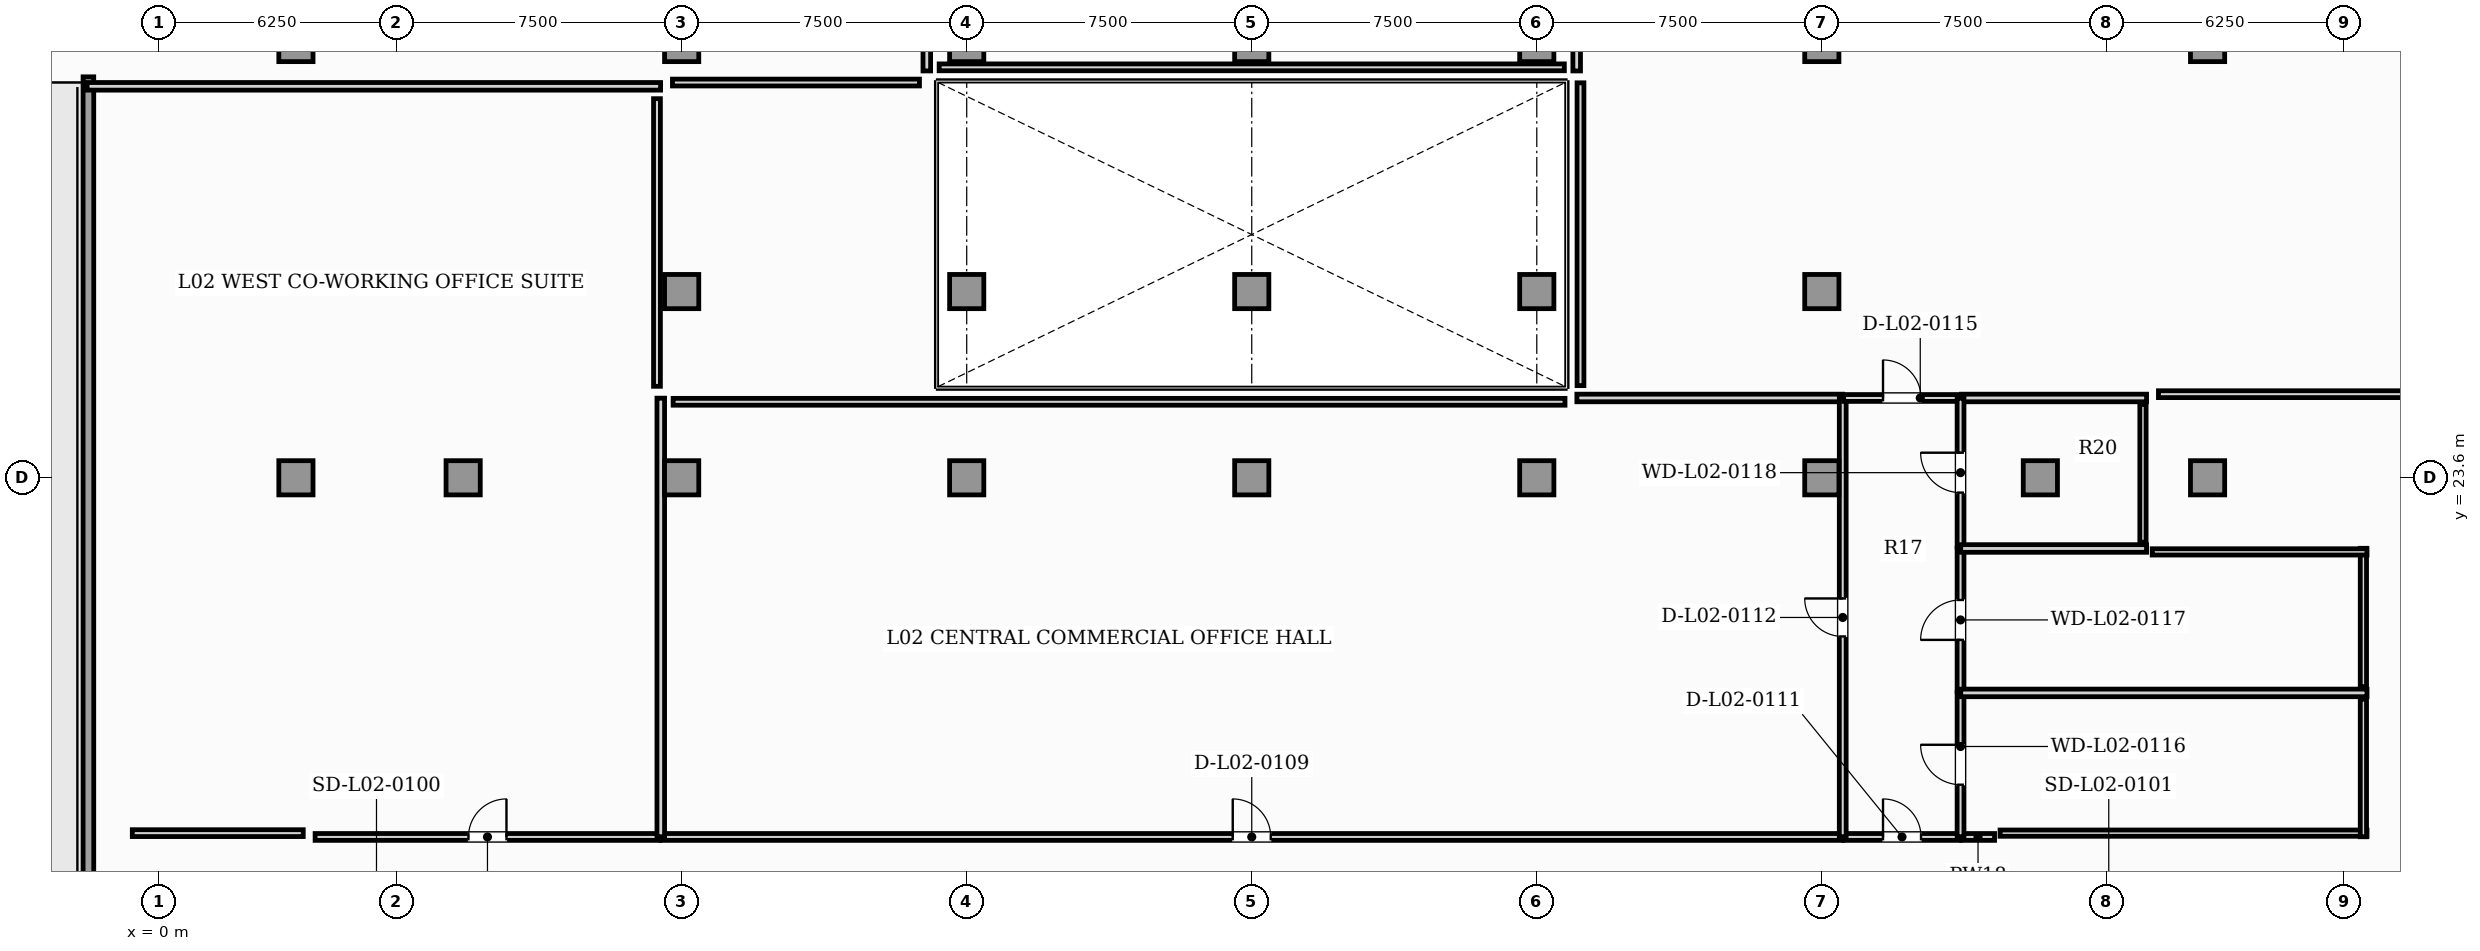
"""IFC4 building model, lengths in metres.
Left out: names, types, materials, properties, quantities, classifications, styles, units other than length and angle.
Written with IfcOpenShell. Run it as: python <this file> out.ifc"""

import sys

from ifc_helpers import new_model, si_unit, direction, frame, frame_2d, origin, origin_2d, place, context, subcontext, project, spatial, rectangle, extrude, element, fill, save


model = new_model("IFC4")
c1 = context("Model", 3, precision=1e-05, world=origin(), true_north=direction((0.0, 1.0)))
c2 = subcontext(c1, "Body", "Model", "MODEL_VIEW")
j1 = project(units=[si_unit("LENGTHUNIT", "METRE"), si_unit("PLANEANGLEUNIT", "RADIAN")], contexts=[c1])
p1 = place(None, origin())
s1 = spatial("IfcSite", under=j1, at=p1, CompositionType="ELEMENT")
p2 = place(p1, origin())
s2 = spatial("IfcBuilding", under=s1, at=p2, CompositionType="ELEMENT")
p3 = place(p2, frame((0.0, 0.0, 10.2)))
s3 = spatial("IfcBuildingStorey", under=s2, at=p3, CompositionType="ELEMENT", Elevation=10.2)
p4 = place(p3, frame((-1.86, 3.88, 0.0), z_axis=(0.0, 0.0, 1.0), x_axis=(0.0, 1.0, 0.0)))
e1 = element("IfcWall", 1, at=p4, inside=s3, PredefinedType="SHEAR", context=c2, shape_type="SweptSolid", body=[
    extrude(rectangle(XDim=30.27, YDim=0.28, at=frame_2d((15.135, 0.0))), origin(), (0.0, 0.0, 1.0), 4.52),
])
for number, where, z_axis, x_axis in (
    (2, (3.6, 23.6, 0.0), (0.0, 0.0, 1.0), (1.0, 0.0, 0.0)),
    (3, (3.6, 35.0, 0.0), (0.0, 0.0, 1.0), (1.0, 0.0, 0.0)),
    (4, (13.75, 23.6, 0.0), (0.0, 0.0, 1.0), (1.0, 0.0, 0.0)),
    (5, (13.75, 35.0, 0.0), (0.0, 0.0, 1.0), (1.0, 0.0, 0.0)),
    (6, (28.75, 23.6, 0.0), (0.0, 0.0, 1.0), (1.0, 0.0, 0.0)),
    (7, (28.75, 35.0, 0.0), (0.0, 0.0, 1.0), (1.0, 0.0, 0.0)),
    (8, (43.75, 23.6, 0.0), (0.0, 0.0, 1.0), (1.0, 0.0, 0.0)),
    (9, (43.75, 35.0, 0.0), (0.0, 0.0, 1.0), (1.0, 0.0, 0.0)),
    (10, (53.9, 23.6, 0.0), (0.0, 0.0, 1.0), (1.0, 0.0, 0.0)),
    (11, (53.9, 35.0, 0.0), (0.0, 0.0, 1.0), (1.0, 0.0, 0.0)),
    (12, (8.0, 23.6, 0.0), (0.0, 0.0, 1.0), (1.0, 0.0, 0.0)),
    (13, (21.25, 23.6, 0.0), (0.0, 0.0, 1.0), (1.0, 0.0, 0.0)),
    (14, (36.25, 23.6, 0.0), (0.0, 0.0, 1.0), (1.0, 0.0, 0.0)),
    (15, (49.5, 23.6, 0.0), (0.0, 0.0, 1.0), (1.0, 0.0, 0.0)),
    (16, (13.75, 28.5, 0.0), (0.0, 0.0, 1.0), (1.0, 0.0, 0.0)),
    (17, (21.25, 28.5, 0.0), (0.0, 0.0, 1.0), (1.0, 0.0, 0.0)),
    (18, (28.75, 28.5, 0.0), (0.0, 0.0, 1.0), (1.0, 0.0, 0.0)),
    (19, (36.25, 28.5, 0.0), (0.0, 0.0, 1.0), (1.0, 0.0, 0.0)),
    (20, (43.75, 28.5, 0.0), (0.0, 0.0, 1.0), (1.0, 0.0, 0.0)),
    (21, (21.25, 35.0, 0.0), (0.0, 0.0, 1.0), (1.0, 0.0, 0.0)),
    (22, (36.25, 35.0, 0.0), (0.0, 0.0, 1.0), (1.0, 0.0, 0.0)),
):
    element("IfcColumn", number, at=place(p3, frame(where, z_axis=z_axis, x_axis=x_axis)), inside=s3, PredefinedType="COLUMN", context=c2, shape_type="SweptSolid", body=[
        extrude(rectangle(XDim=0.9, YDim=0.9, at=origin_2d()), origin(), (0.0, 0.0, 1.0), 4.8),
    ])
p5 = place(p3, frame((13.205, 14.15, 0.0), z_axis=(0.0, 0.0, 1.0), x_axis=(1.0, 0.0, 0.0)))
e23 = element("IfcWall", 23, at=p5, inside=s3, PredefinedType="PARTITIONING", context=c2, shape_type="SweptSolid", body=[
    extrude(rectangle(XDim=31.09, YDim=0.18, at=frame_2d((15.545, 0.0))), origin(), (0.0, 0.0, 1.0), 4.52),
])
p6 = place(p5, frame((15.045, 0.0, 0.0)))
e24 = element("IfcOpeningElement", 24, at=p6, cuts=e23, PredefinedType="OPENING", context=c2, shape_type="SweptSolid", body=[
    extrude(rectangle(XDim=1.0, YDim=2.15, at=frame_2d((0.5, 1.075))), frame((0.0, 0.1, 0.0), z_axis=(0.0, -1.0, 0.0), x_axis=(1.0, 0.0, 0.0)), (0.0, 0.0, 1.0), 0.2),
])
p7 = place(p3, frame((4.105, 14.15, 0.0), z_axis=(0.0, 0.0, 1.0), x_axis=(1.0, 0.0, 0.0)))
e25 = element("IfcWall", 25, at=p7, inside=s3, PredefinedType="PARTITIONING", context=c2, shape_type="SweptSolid", body=[
    extrude(rectangle(XDim=9.07, YDim=0.18, at=frame_2d((4.535, 0.0))), origin(), (0.0, 0.0, 1.0), 4.52),
])
p8 = place(p7, frame((4.035, 0.0, 0.0)))
e26 = element("IfcOpeningElement", 26, at=p8, cuts=e25, PredefinedType="OPENING", context=c2, shape_type="SweptSolid", body=[
    extrude(rectangle(XDim=1.0, YDim=2.15, at=frame_2d((0.5, 1.075))), frame((0.0, 0.1, 0.0), z_axis=(0.0, -1.0, 0.0), x_axis=(1.0, 0.0, 0.0)), (0.0, 0.0, 1.0), 0.2),
])
p9 = place(p3, frame((44.325, 14.15, 0.0), z_axis=(0.0, 0.0, 1.0), x_axis=(1.0, 0.0, 0.0)))
e27 = element("IfcWall", 27, at=p9, inside=s3, PredefinedType="PARTITIONING", context=c2, shape_type="SweptSolid", body=[
    extrude(rectangle(XDim=3.07, YDim=0.18, at=frame_2d((1.535, 0.0))), origin(), (0.0, 0.0, 1.0), 4.52),
])
p10 = place(p9, frame((1.035, 0.0, 0.0)))
e28 = element("IfcOpeningElement", 28, at=p10, cuts=e27, PredefinedType="OPENING", context=c2, shape_type="SweptSolid", body=[
    extrude(rectangle(XDim=1.0, YDim=2.15, at=frame_2d((0.5, 1.075))), frame((0.0, 0.1, 0.0), z_axis=(0.0, -1.0, 0.0), x_axis=(1.0, 0.0, 0.0)), (0.0, 0.0, 1.0), 0.2),
])
p11 = place(p3, frame((47.425, 14.15, 0.0), z_axis=(0.0, 0.0, 1.0), x_axis=(1.0, 0.0, 0.0)))
e29 = element("IfcWall", 29, at=p11, inside=s3, PredefinedType="PARTITIONING", context=c2, shape_type="SweptSolid", body=[
    extrude(rectangle(XDim=0.87, YDim=0.18, at=frame_2d((0.435, 0.0))), origin(), (0.0, 0.0, 1.0), 4.52),
])
p12 = place(p3, frame((13.2, 14.155, 0.0), z_axis=(0.0, 0.0, 1.0), x_axis=(0.0, 1.0, 0.0)))
e30 = element("IfcWall", 30, at=p12, inside=s3, PredefinedType="PARTITIONING", context=c2, shape_type="SweptSolid", body=[
    extrude(rectangle(XDim=11.54, YDim=0.2, at=frame_2d((5.77, 0.0))), origin(), (0.0, 0.0, 1.0), 4.52),
])
p13 = place(p3, frame((37.305, 25.7, 0.0), z_axis=(0.0, 0.0, 1.0), x_axis=(1.0, 0.0, 0.0)))
e31 = element("IfcWall", 31, at=p13, inside=s3, PredefinedType="PARTITIONING", context=c2, shape_type="SweptSolid", body=[
    extrude(rectangle(XDim=6.99, YDim=0.2, at=frame_2d((3.495, 0.0))), origin(), (0.0, 0.0, 1.0), 4.52),
])
p14 = place(p3, frame((44.3, 14.155, 0.0), z_axis=(0.0, 0.0, 1.0), x_axis=(0.0, 1.0, 0.0)))
e32 = element("IfcWall", 32, at=p14, inside=s3, PredefinedType="PARTITIONING", context=c2, shape_type="SweptSolid", body=[
    extrude(rectangle(XDim=11.54, YDim=0.18, at=frame_2d((5.77, 0.0))), origin(), (0.0, 0.0, 1.0), 4.52),
])
p15 = place(p14, frame((5.27, 0.0, 0.0)))
e33 = element("IfcOpeningElement", 33, at=p15, cuts=e32, PredefinedType="OPENING", context=c2, shape_type="SweptSolid", body=[
    extrude(rectangle(XDim=1.0, YDim=2.15, at=frame_2d((0.5, 1.075))), frame((0.0, 0.1, 0.0), z_axis=(0.0, -1.0, 0.0), x_axis=(1.0, 0.0, 0.0)), (0.0, 0.0, 1.0), 0.2),
])
p16 = place(p3, frame((-1.895, 33.9, 0.0), z_axis=(0.0, 0.0, 1.0), x_axis=(1.0, 0.0, 0.0)))
e34 = element("IfcWall", 34, at=p16, inside=s3, PredefinedType="PARTITIONING", context=c2, shape_type="SweptSolid", body=[
    extrude(rectangle(XDim=15.09, YDim=0.2, at=frame_2d((7.545, 0.0))), origin(), (0.0, 0.0, 1.0), 4.52),
])
p17 = place(p3, frame((20.2, 34.305, 0.0), z_axis=(0.0, 0.0, 1.0), x_axis=(0.0, 1.0, 0.0)))
e35 = element("IfcWall", 35, at=p17, inside=s3, PredefinedType="PARTITIONING", context=c2, shape_type="SweptSolid", body=[
    extrude(rectangle(XDim=12.79, YDim=0.2, at=frame_2d((6.395, 0.0))), origin(), (0.0, 0.0, 1.0), 4.52),
])
p18 = place(p17, frame((4.017, 0.0, 0.0)))
e36 = element("IfcOpeningElement", 36, at=p18, cuts=e35, PredefinedType="OPENING", context=c2, shape_type="SweptSolid", body=[
    extrude(rectangle(XDim=0.92, YDim=2.1, at=frame_2d((0.46, 1.05))), frame((0.0, 0.11, 0.0), z_axis=(0.0, -1.0, 0.0), x_axis=(1.0, 0.0, 0.0)), (0.0, 0.0, 1.0), 0.22),
])
p19 = place(p3, frame((37.3, 34.305, 0.0), z_axis=(0.0, 0.0, 1.0), x_axis=(0.0, 1.0, 0.0)))
e37 = element("IfcWall", 37, at=p19, inside=s3, PredefinedType="PARTITIONING", context=c2, shape_type="SweptSolid", body=[
    extrude(rectangle(XDim=12.79, YDim=0.2, at=frame_2d((6.395, 0.0))), origin(), (0.0, 0.0, 1.0), 4.52),
])
p20 = place(p19, frame((4.017, 0.0, 0.0)))
e38 = element("IfcOpeningElement", 38, at=p20, cuts=e37, PredefinedType="OPENING", context=c2, shape_type="SweptSolid", body=[
    extrude(rectangle(XDim=0.92, YDim=2.1, at=frame_2d((0.46, 1.05))), frame((0.0, 0.11, 0.0), z_axis=(0.0, -1.0, 0.0), x_axis=(1.0, 0.0, 0.0)), (0.0, 0.0, 1.0), 0.22),
])
p21 = place(p3, frame((44.325, 25.7, 0.0), z_axis=(0.0, 0.0, 1.0), x_axis=(1.0, 0.0, 0.0)))
e39 = element("IfcWall", 39, at=p21, inside=s3, PredefinedType="PARTITIONING", context=c2, shape_type="SweptSolid", body=[
    extrude(rectangle(XDim=3.07, YDim=0.18, at=frame_2d((1.535, 0.0))), origin(), (0.0, 0.0, 1.0), 4.52),
])
p22 = place(p21, frame((1.035, 0.0, 0.0)))
e40 = element("IfcOpeningElement", 40, at=p22, cuts=e39, PredefinedType="OPENING", context=c2, shape_type="SweptSolid", body=[
    extrude(rectangle(XDim=1.0, YDim=2.15, at=frame_2d((0.5, 1.075))), frame((0.0, 0.1, 0.0), z_axis=(0.0, -1.0, 0.0), x_axis=(1.0, 0.0, 0.0)), (0.0, 0.0, 1.0), 0.2),
])
p23 = place(p3, frame((47.425, 25.7, 0.0), z_axis=(0.0, 0.0, 1.0), x_axis=(1.0, 0.0, 0.0)))
e41 = element("IfcWall", 41, at=p23, inside=s3, PredefinedType="PARTITIONING", context=c2, shape_type="SweptSolid", body=[
    extrude(rectangle(XDim=4.87, YDim=0.2, at=frame_2d((2.435, 0.0))), origin(), (0.0, 0.0, 1.0), 4.52),
])
p24 = place(p3, frame((47.4, 14.155, 0.0), z_axis=(0.0, 0.0, 1.0), x_axis=(0.0, 1.0, 0.0)))
e42 = element("IfcWall", 42, at=p24, inside=s3, PredefinedType="PARTITIONING", context=c2, shape_type="SweptSolid", body=[
    extrude(rectangle(XDim=3.79, YDim=0.18, at=frame_2d((1.895, 0.0))), origin(), (0.0, 0.0, 1.0), 4.52),
])
p25 = place(p24, frame((1.37, 0.0, 0.0)))
e43 = element("IfcOpeningElement", 43, at=p25, cuts=e42, PredefinedType="OPENING", context=c2, shape_type="SweptSolid", body=[
    extrude(rectangle(XDim=1.05, YDim=2.15, at=frame_2d((0.525, 1.075))), frame((0.0, 0.1, 0.0), z_axis=(0.0, -1.0, 0.0), x_axis=(1.0, 0.0, 0.0)), (0.0, 0.0, 1.0), 0.2),
])
p26 = place(p3, frame((47.4, 17.975, 0.0), z_axis=(0.0, 0.0, 1.0), x_axis=(0.0, 1.0, 0.0)))
e44 = element("IfcWall", 44, at=p26, inside=s3, PredefinedType="PARTITIONING", context=c2, shape_type="SweptSolid", body=[
    extrude(rectangle(XDim=3.77, YDim=0.18, at=frame_2d((1.885, 0.0))), origin(), (0.0, 0.0, 1.0), 4.52),
])
p27 = place(p26, frame((1.36, 0.0, 0.0)))
e45 = element("IfcOpeningElement", 45, at=p27, cuts=e44, PredefinedType="OPENING", context=c2, shape_type="SweptSolid", body=[
    extrude(rectangle(XDim=1.05, YDim=2.15, at=frame_2d((0.525, 1.075))), frame((0.0, 0.1, 0.0), z_axis=(0.0, -1.0, 0.0), x_axis=(1.0, 0.0, 0.0)), (0.0, 0.0, 1.0), 0.2),
])
p28 = place(p3, frame((47.4, 21.775, 0.0), z_axis=(0.0, 0.0, 1.0), x_axis=(0.0, 1.0, 0.0)))
e46 = element("IfcWall", 46, at=p28, inside=s3, PredefinedType="PARTITIONING", context=c2, shape_type="SweptSolid", body=[
    extrude(rectangle(XDim=3.92, YDim=0.18, at=frame_2d((1.96, 0.0))), origin(), (0.0, 0.0, 1.0), 4.52),
])
p29 = place(p28, frame((1.435, 0.0, 0.0)))
e47 = element("IfcOpeningElement", 47, at=p29, cuts=e46, PredefinedType="OPENING", context=c2, shape_type="SweptSolid", body=[
    extrude(rectangle(XDim=1.05, YDim=2.15, at=frame_2d((0.525, 1.075))), frame((0.0, 0.1, 0.0), z_axis=(0.0, -1.0, 0.0), x_axis=(1.0, 0.0, 0.0)), (0.0, 0.0, 1.0), 0.2),
])
p30 = place(p3, frame((47.405, 17.94, 0.0), z_axis=(0.0, 0.0, 1.0), x_axis=(1.0, 0.0, 0.0)))
e48 = element("IfcWall", 48, at=p30, inside=s3, PredefinedType="PARTITIONING", context=c2, shape_type="SweptSolid", body=[
    extrude(rectangle(XDim=10.69, YDim=0.2, at=frame_2d((5.345, 0.0))), origin(), (0.0, 0.0, 1.0), 4.52),
])
p31 = place(p3, frame((47.405, 21.74, 0.0), z_axis=(0.0, 0.0, 1.0), x_axis=(1.0, 0.0, 0.0)))
e49 = element("IfcWall", 49, at=p31, inside=s3, PredefinedType="PARTITIONING", context=c2, shape_type="SweptSolid", body=[
    extrude(rectangle(XDim=4.89, YDim=0.2, at=frame_2d((2.445, 0.0))), origin(), (0.0, 0.0, 1.0), 4.52),
])
p32 = place(p3, frame((36.993, 25.6, 0.0), z_axis=(0.0, 0.0, 1.0), x_axis=(-1.0, 0.0, 0.0)))
e50 = element("IfcWall", 50, at=p32, inside=s3, PredefinedType="PARTITIONING", context=c2, shape_type="SweptSolid", body=[
    extrude(rectangle(XDim=23.468, YDim=0.18, at=frame_2d((11.734, 0.0))), origin(), (0.0, 0.0, 1.0), 4.52),
])
p33 = place(p3, frame((-0.705, 14.25, 0.0), z_axis=(0.0, 0.0, 1.0), x_axis=(1.0, 0.0, 0.0)))
e51 = element("IfcWall", 51, at=p33, inside=s3, PredefinedType="PARTITIONING", context=c2, shape_type="SweptSolid", body=[
    extrude(rectangle(XDim=4.498, YDim=0.18, at=frame_2d((2.249, 0.0))), origin(), (0.0, 0.0, 1.0), 4.52),
])
p34 = place(p3, frame((13.1, 26.007, 0.0), z_axis=(0.0, 0.0, 1.0), x_axis=(0.0, 1.0, 0.0)))
e52 = element("IfcWall", 52, at=p34, inside=s3, PredefinedType="PARTITIONING", context=c2, shape_type="SweptSolid", body=[
    extrude(rectangle(XDim=7.568, YDim=0.18, at=frame_2d((3.784, 0.0))), origin(), (0.0, 0.0, 1.0), 4.52),
])
p35 = place(p3, frame((13.507, 34.0, 0.0), z_axis=(0.0, 0.0, 1.0), x_axis=(1.0, 0.0, 0.0)))
e53 = element("IfcWall", 53, at=p35, inside=s3, PredefinedType="PARTITIONING", context=c2, shape_type="SweptSolid", body=[
    extrude(rectangle(XDim=6.5, YDim=0.18, at=frame_2d((3.25, 0.0))), origin(), (0.0, 0.0, 1.0), 4.52),
])
p36 = place(p3, frame((20.525, 34.4, 0.0), z_axis=(0.0, 0.0, 1.0), x_axis=(1.0, 0.0, 0.0)))
e54 = element("IfcWall", 54, at=p36, inside=s3, PredefinedType="PARTITIONING", context=c2, shape_type="SweptSolid", body=[
    extrude(rectangle(XDim=16.45, YDim=0.18, at=frame_2d((8.225, 0.0))), origin(), (0.0, 0.0, 1.0), 4.52),
])
p37 = place(p3, frame((52.607, 25.8, 0.0), z_axis=(0.0, 0.0, 1.0), x_axis=(1.0, 0.0, 0.0)))
e55 = element("IfcWall", 55, at=p37, inside=s3, PredefinedType="PARTITIONING", context=c2, shape_type="SweptSolid", body=[
    extrude(rectangle(XDim=9.988, YDim=0.18, at=frame_2d((4.994, 0.0))), origin(), (0.0, 0.0, 1.0), 4.52),
])
p38 = place(p3, frame((37.4, 33.993, 0.0), z_axis=(0.0, 0.0, 1.0), x_axis=(0.0, -1.0, 0.0)))
e56 = element("IfcWall", 56, at=p38, inside=s3, PredefinedType="PARTITIONING", context=c2, shape_type="SweptSolid", body=[
    extrude(rectangle(XDim=7.968, YDim=0.18, at=frame_2d((3.984, 0.0))), origin(), (0.0, 0.0, 1.0), 4.52),
])
p39 = place(p3, frame((48.44, 14.25, 0.0), z_axis=(0.0, 0.0, 1.0), x_axis=(1.0, 0.0, 0.0)))
e57 = element("IfcWall", 57, at=p39, inside=s3, PredefinedType="PLUMBINGWALL", context=c2, shape_type="SweptSolid", body=[
    extrude(rectangle(XDim=9.655, YDim=0.165, at=frame_2d((4.828, 0.0))), origin(), (0.0, 0.0, 1.0), 4.52),
])
p40 = place(p3, frame((58.0, 14.155, 0.0), z_axis=(0.0, 0.0, 1.0), x_axis=(0.0, 1.0, 0.0)))
e58 = element("IfcWall", 58, at=p40, inside=s3, PredefinedType="PLUMBINGWALL", context=c2, shape_type="SweptSolid", body=[
    extrude(rectangle(XDim=3.62, YDim=0.165, at=frame_2d((1.81, 0.0))), origin(), (0.0, 0.0, 1.0), 4.52),
])
p41 = place(p3, frame((58.0, 18.105, 0.0), z_axis=(0.0, 0.0, 1.0), x_axis=(0.0, 1.0, 0.0)))
e59 = element("IfcWall", 59, at=p41, inside=s3, PredefinedType="PLUMBINGWALL", context=c2, shape_type="SweptSolid", body=[
    extrude(rectangle(XDim=3.64, YDim=0.165, at=frame_2d((1.82, 0.0))), origin(), (0.0, 0.0, 1.0), 4.52),
])
p42 = place(p3, frame((58.095, 21.65, 0.0), z_axis=(0.0, 0.0, 1.0), x_axis=(-1.0, 0.0, 0.0)))
e60 = element("IfcWall", 60, at=p42, inside=s3, PredefinedType="PLUMBINGWALL", context=c2, shape_type="SweptSolid", body=[
    extrude(rectangle(XDim=5.651, YDim=0.165, at=frame_2d((2.826, 0.0))), origin(), (0.0, 0.0, 1.0), 4.52),
])
p43 = place(p3, frame((52.2, 21.905, 0.0), z_axis=(0.0, 0.0, 1.0), x_axis=(0.0, 1.0, 0.0)))
e61 = element("IfcWall", 61, at=p43, inside=s3, PredefinedType="PLUMBINGWALL", context=c2, shape_type="SweptSolid", body=[
    extrude(rectangle(XDim=3.63, YDim=0.165, at=frame_2d((1.815, 0.0))), origin(), (0.0, 0.0, 1.0), 4.52),
])
p44 = place(p6, origin())
e62 = element("IfcDoor", 62, at=p44, inside=s3, OperationType="SINGLE_SWING_LEFT", PredefinedType="DOOR", context=c2, shape_type="SweptSolid", body=[
    extrude(rectangle(XDim=1.0, YDim=2.15, at=frame_2d((0.5, 1.075))), frame((0.0, 0.025, 0.0), z_axis=(0.0, -1.0, 0.0), x_axis=(1.0, 0.0, 0.0)), (0.0, 0.0, 1.0), 0.05),
])
fill(e24, e62)
p45 = place(p8, origin())
e63 = element("IfcDoor", 63, at=p45, inside=s3, OperationType="SINGLE_SWING_RIGHT", PredefinedType="DOOR", context=c2, shape_type="SweptSolid", body=[
    extrude(rectangle(XDim=1.0, YDim=2.15, at=frame_2d((0.5, 1.075))), frame((0.0, 0.025, 0.0), z_axis=(0.0, -1.0, 0.0), x_axis=(1.0, 0.0, 0.0)), (0.0, 0.0, 1.0), 0.05),
])
fill(e26, e63)
p46 = place(p10, origin())
e64 = element("IfcDoor", 64, at=p46, inside=s3, OperationType="SINGLE_SWING_LEFT", PredefinedType="DOOR", context=c2, shape_type="SweptSolid", body=[
    extrude(rectangle(XDim=1.0, YDim=2.15, at=frame_2d((0.5, 1.075))), frame((0.0, 0.025, 0.0), z_axis=(0.0, -1.0, 0.0), x_axis=(1.0, 0.0, 0.0)), (0.0, 0.0, 1.0), 0.05),
])
fill(e28, e64)
p47 = place(p15, origin())
e65 = element("IfcDoor", 65, at=p47, inside=s3, OperationType="SINGLE_SWING_RIGHT", PredefinedType="DOOR", context=c2, shape_type="SweptSolid", body=[
    extrude(rectangle(XDim=1.0, YDim=2.15, at=frame_2d((0.5, 1.075))), frame((0.0, 0.025, 0.0), z_axis=(0.0, -1.0, 0.0), x_axis=(1.0, 0.0, 0.0)), (0.0, 0.0, 1.0), 0.05),
])
fill(e33, e65)
p48 = place(p22, origin())
e66 = element("IfcDoor", 66, at=p48, inside=s3, OperationType="SINGLE_SWING_LEFT", PredefinedType="DOOR", context=c2, shape_type="SweptSolid", body=[
    extrude(rectangle(XDim=1.0, YDim=2.15, at=frame_2d((0.5, 1.075))), frame((0.0, 0.025, 0.0), z_axis=(0.0, -1.0, 0.0), x_axis=(1.0, 0.0, 0.0)), (0.0, 0.0, 1.0), 0.05),
])
fill(e40, e66)
p49 = place(p25, origin())
e67 = element("IfcDoor", 67, at=p49, inside=s3, OperationType="SINGLE_SWING_RIGHT", PredefinedType="DOOR", context=c2, shape_type="SweptSolid", body=[
    extrude(rectangle(XDim=1.05, YDim=2.15, at=frame_2d((0.525, 1.075))), frame((0.0, 0.025, 0.0), z_axis=(0.0, -1.0, 0.0), x_axis=(1.0, 0.0, 0.0)), (0.0, 0.0, 1.0), 0.05),
])
fill(e43, e67)
p50 = place(p27, origin())
e68 = element("IfcDoor", 68, at=p50, inside=s3, OperationType="SINGLE_SWING_LEFT", PredefinedType="DOOR", context=c2, shape_type="SweptSolid", body=[
    extrude(rectangle(XDim=1.05, YDim=2.15, at=frame_2d((0.525, 1.075))), frame((0.0, 0.025, 0.0), z_axis=(0.0, -1.0, 0.0), x_axis=(1.0, 0.0, 0.0)), (0.0, 0.0, 1.0), 0.05),
])
fill(e45, e68)
p51 = place(p29, origin())
e69 = element("IfcDoor", 69, at=p51, inside=s3, OperationType="SINGLE_SWING_RIGHT", PredefinedType="DOOR", context=c2, shape_type="SweptSolid", body=[
    extrude(rectangle(XDim=1.05, YDim=2.15, at=frame_2d((0.525, 1.075))), frame((0.0, 0.025, 0.0), z_axis=(0.0, -1.0, 0.0), x_axis=(1.0, 0.0, 0.0)), (0.0, 0.0, 1.0), 0.05),
])
fill(e47, e69)
save(model, sys.argv[1])
